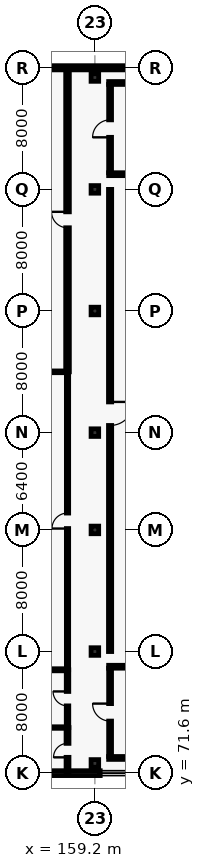
"""IFC4 building model, lengths in metres.
Left out: names, types, materials, properties, quantities, classifications, styles, units other than length and angle.
Written with IfcOpenShell. Run it as: python <this file> out.ifc"""

import sys

from ifc_helpers import new_model, si_unit, direction, frame, frame_2d, origin, origin_2d, place, context, subcontext, project, spatial, rectangle, extrude, element, fill, save


model = new_model("IFC4")
c1 = context("Model", 3, precision=1e-05, world=origin(), true_north=direction((0.0, 1.0)))
c2 = subcontext(c1, "Body", "Model", "MODEL_VIEW")
j1 = project(units=[si_unit("LENGTHUNIT", "METRE"), si_unit("PLANEANGLEUNIT", "RADIAN")], contexts=[c1])
p1 = place(None, origin())
s1 = spatial("IfcSite", under=j1, at=p1, CompositionType="ELEMENT")
p2 = place(p1, origin())
s2 = spatial("IfcBuilding", under=s1, at=p2, CompositionType="ELEMENT")
p3 = place(p2, frame((0.0, 0.0, 24.9)))
s3 = spatial("IfcBuildingStorey", under=s2, at=p3, CompositionType="ELEMENT", Elevation=24.9)
for number, where, z_axis, x_axis in (
    (1, (159.2, 72.24, 0.0), (0.0, 0.0, 1.0), (1.0, 0.0, 0.0)),
    (2, (159.2, 79.6, 0.0), (0.0, 0.0, 1.0), (1.0, 0.0, 0.0)),
    (3, (159.2, 87.6, 0.0), (0.0, 0.0, 1.0), (1.0, 0.0, 0.0)),
    (4, (159.2, 94.0, 0.0), (0.0, 0.0, 1.0), (1.0, 0.0, 0.0)),
    (5, (159.2, 102.0, 0.0), (0.0, 0.0, 1.0), (1.0, 0.0, 0.0)),
    (6, (159.2, 110.0, 0.0), (0.0, 0.0, 1.0), (1.0, 0.0, 0.0)),
    (7, (159.2, 117.36, 0.0), (0.0, 0.0, 1.0), (1.0, 0.0, 0.0)),
):
    element("IfcColumn", number, at=place(p3, frame(where, z_axis=z_axis, x_axis=x_axis)), inside=s3, PredefinedType="COLUMN", context=c2, shape_type="SweptSolid", body=[
        extrude(rectangle(XDim=0.5, YDim=0.5, at=origin_2d()), origin(), (0.0, 0.0, 1.0), 4.5),
    ])
p4 = place(p3, frame((152.8, 118.0, 0.0), z_axis=(0.0, 0.0, 1.0), x_axis=(1.0, 0.0, 0.0)))
e8 = element("IfcWall", 8, at=p4, inside=s3, PredefinedType="SOLIDWALL", context=c2, shape_type="SweptSolid", body=[
    extrude(rectangle(XDim=19.2, YDim=0.275, at=frame_2d((9.6, 0.0))), origin(), (0.0, 0.0, 1.0), 4.3),
])
p5 = place(p4, frame((0.75, 0.0, 0.9)))
e9 = element("IfcOpeningElement", 9, at=p5, cuts=e8, PredefinedType="OPENING", context=c2, shape_type="SweptSolid", body=[
    extrude(rectangle(XDim=1.6, YDim=1.65, at=frame_2d((0.8, 0.825))), frame((0.0, 0.147, 0.0), z_axis=(0.0, -1.0, 0.0), x_axis=(1.0, 0.0, 0.0)), (0.0, 0.0, 1.0), 0.295),
])
p6 = place(p4, frame((10.0, 0.0, 0.9)))
e10 = element("IfcOpeningElement", 10, at=p6, cuts=e8, PredefinedType="OPENING", context=c2, shape_type="SweptSolid", body=[
    extrude(rectangle(XDim=1.4, YDim=2.1, at=frame_2d((0.7, 1.05))), frame((0.0, 0.147, 0.0), z_axis=(0.0, -1.0, 0.0), x_axis=(1.0, 0.0, 0.0)), (0.0, 0.0, 1.0), 0.295),
])
p7 = place(p3, frame((172.0, 71.6, 0.0), z_axis=(0.0, 0.0, 1.0), x_axis=(-1.0, 0.0, 0.0)))
e11 = element("IfcWall", 11, at=p7, inside=s3, PredefinedType="SOLIDWALL", context=c2, shape_type="SweptSolid", body=[
    extrude(rectangle(XDim=19.2, YDim=0.32, at=frame_2d((9.6, 0.0))), origin(), (0.0, 0.0, 1.0), 4.3),
])
p8 = place(p7, frame((10.0, 0.0, 0.8)))
e12 = element("IfcOpeningElement", 12, at=p8, cuts=e11, PredefinedType="OPENING", context=c2, shape_type="SweptSolid", body=[
    extrude(rectangle(XDim=2.45, YDim=2.8, at=frame_2d((1.225, 1.4))), frame((0.0, 0.17, 0.0), z_axis=(0.0, -1.0, 0.0), x_axis=(1.0, 0.0, 0.0)), (0.0, 0.0, 1.0), 0.34),
])
p9 = place(p3, frame((160.105, 72.6, 0.0), z_axis=(0.0, 0.0, 1.0), x_axis=(1.0, 0.0, 0.0)))
e13 = element("IfcWall", 13, at=p9, inside=s3, PredefinedType="PARTITIONING", context=c2, shape_type="SweptSolid", body=[
    extrude(rectangle(XDim=4.495, YDim=0.19, at=frame_2d((2.248, 0.0))), origin(), (0.0, 0.0, 1.0), 3.65),
])
p10 = place(p3, frame((160.105, 78.6, 0.0), z_axis=(0.0, 0.0, 1.0), x_axis=(1.0, 0.0, 0.0)))
e14 = element("IfcWall", 14, at=p10, inside=s3, PredefinedType="PARTITIONING", context=c2, shape_type="SweptSolid", body=[
    extrude(rectangle(XDim=4.495, YDim=0.19, at=frame_2d((2.248, 0.0))), origin(), (0.0, 0.0, 1.0), 4.3),
])
p11 = place(p3, frame((160.2, 72.695, 0.0), z_axis=(0.0, 0.0, 1.0), x_axis=(0.0, 1.0, 0.0)))
e15 = element("IfcWall", 15, at=p11, inside=s3, PredefinedType="PARTITIONING", context=c2, shape_type="SweptSolid", body=[
    extrude(rectangle(XDim=5.81, YDim=0.19, at=frame_2d((2.905, 0.0))), origin(), (0.0, 0.0, 1.0), 4.3),
])
p12 = place(p11, frame((2.33, 0.0, 0.0)))
e16 = element("IfcOpeningElement", 16, at=p12, cuts=e15, PredefinedType="OPENING", context=c2, shape_type="SweptSolid", body=[
    extrude(rectangle(XDim=1.15, YDim=2.2, at=frame_2d((0.575, 1.1))), frame((0.0, 0.105, 0.0), z_axis=(0.0, -1.0, 0.0), x_axis=(1.0, 0.0, 0.0)), (0.0, 0.0, 1.0), 0.21),
])
p13 = place(p3, frame((160.105, 111.0, 0.0), z_axis=(0.0, 0.0, 1.0), x_axis=(1.0, 0.0, 0.0)))
e17 = element("IfcWall", 17, at=p13, inside=s3, PredefinedType="PARTITIONING", context=c2, shape_type="SweptSolid", body=[
    extrude(rectangle(XDim=4.495, YDim=0.19, at=frame_2d((2.248, 0.0))), origin(), (0.0, 0.0, 1.0), 4.3),
])
p14 = place(p3, frame((160.105, 117.0, 0.0), z_axis=(0.0, 0.0, 1.0), x_axis=(1.0, 0.0, 0.0)))
e18 = element("IfcWall", 18, at=p14, inside=s3, PredefinedType="PARTITIONING", context=c2, shape_type="SweptSolid", body=[
    extrude(rectangle(XDim=4.495, YDim=0.19, at=frame_2d((2.248, 0.0))), origin(), (0.0, 0.0, 1.0), 3.65),
])
p15 = place(p3, frame((160.2, 111.095, 0.0), z_axis=(0.0, 0.0, 1.0), x_axis=(0.0, 1.0, 0.0)))
e19 = element("IfcWall", 19, at=p15, inside=s3, PredefinedType="PARTITIONING", context=c2, shape_type="SweptSolid", body=[
    extrude(rectangle(XDim=5.81, YDim=0.19, at=frame_2d((2.905, 0.0))), origin(), (0.0, 0.0, 1.0), 4.3),
])
p16 = place(p15, frame((2.33, 0.0, 0.0)))
e20 = element("IfcOpeningElement", 20, at=p16, cuts=e19, PredefinedType="OPENING", context=c2, shape_type="SweptSolid", body=[
    extrude(rectangle(XDim=1.15, YDim=2.2, at=frame_2d((0.575, 1.1))), frame((0.0, 0.105, 0.0), z_axis=(0.0, -1.0, 0.0), x_axis=(1.0, 0.0, 0.0)), (0.0, 0.0, 1.0), 0.21),
])
p17 = place(p3, frame((157.4, 71.6, 0.0), z_axis=(0.0, 0.0, 1.0), x_axis=(0.0, 1.0, 0.0)))
e21 = element("IfcWall", 21, at=p17, inside=s3, PredefinedType="PARTITIONING", context=c2, shape_type="SweptSolid", body=[
    extrude(rectangle(XDim=3.0, YDim=0.19, at=frame_2d((1.5, 0.0))), origin(), (0.0, 0.0, 1.0), 4.3),
])
p18 = place(p17, frame((1.04, 0.0, 0.0)))
e22 = element("IfcOpeningElement", 22, at=p18, cuts=e21, PredefinedType="OPENING", context=c2, shape_type="SweptSolid", body=[
    extrude(rectangle(XDim=0.92, YDim=2.1, at=frame_2d((0.46, 1.05))), frame((0.0, 0.105, 0.0), z_axis=(0.0, -1.0, 0.0), x_axis=(1.0, 0.0, 0.0)), (0.0, 0.0, 1.0), 0.21),
])
p19 = place(p3, frame((157.4, 74.6, 0.0), z_axis=(0.0, 0.0, 1.0), x_axis=(0.0, 1.0, 0.0)))
e23 = element("IfcWall", 23, at=p19, inside=s3, PredefinedType="PARTITIONING", context=c2, shape_type="SweptSolid", body=[
    extrude(rectangle(XDim=3.8, YDim=0.165, at=frame_2d((1.9, 0.0))), origin(), (0.0, 0.0, 1.0), 4.3),
])
p20 = place(p19, frame((1.425, 0.0, 0.0)))
e24 = element("IfcOpeningElement", 24, at=p20, cuts=e23, PredefinedType="OPENING", context=c2, shape_type="SweptSolid", body=[
    extrude(rectangle(XDim=0.95, YDim=2.1, at=frame_2d((0.475, 1.05))), frame((0.0, 0.093, 0.0), z_axis=(0.0, -1.0, 0.0), x_axis=(1.0, 0.0, 0.0)), (0.0, 0.0, 1.0), 0.185),
])
p21 = place(p3, frame((157.4, 78.4, 0.0), z_axis=(0.0, 0.0, 1.0), x_axis=(0.0, 1.0, 0.0)))
e25 = element("IfcWall", 25, at=p21, inside=s3, PredefinedType="PARTITIONING", context=c2, shape_type="SweptSolid", body=[
    extrude(rectangle(XDim=19.6, YDim=0.15, at=frame_2d((9.8, 0.0))), origin(), (0.0, 0.0, 1.0), 4.3),
])
p22 = place(p21, frame((9.29, 0.0, 0.0)))
e26 = element("IfcOpeningElement", 26, at=p22, cuts=e25, PredefinedType="OPENING", context=c2, shape_type="SweptSolid", body=[
    extrude(rectangle(XDim=1.02, YDim=2.1, at=frame_2d((0.51, 1.05))), frame((0.0, 0.085, 0.0), z_axis=(0.0, -1.0, 0.0), x_axis=(1.0, 0.0, 0.0)), (0.0, 0.0, 1.0), 0.17),
])
p23 = place(p3, frame((157.4, 98.0, 0.0), z_axis=(0.0, 0.0, 1.0), x_axis=(0.0, 1.0, 0.0)))
e27 = element("IfcWall", 27, at=p23, inside=s3, PredefinedType="PARTITIONING", context=c2, shape_type="SweptSolid", body=[
    extrude(rectangle(XDim=20.0, YDim=0.24, at=frame_2d((10.0, 0.0))), origin(), (0.0, 0.0, 1.0), 4.3),
])
p24 = place(p23, frame((9.475, 0.0, 0.0)))
e28 = element("IfcOpeningElement", 28, at=p24, cuts=e27, PredefinedType="OPENING", context=c2, shape_type="SweptSolid", body=[
    extrude(rectangle(XDim=1.05, YDim=2.15, at=frame_2d((0.525, 1.075))), frame((0.0, 0.13, 0.0), z_axis=(0.0, -1.0, 0.0), x_axis=(1.0, 0.0, 0.0)), (0.0, 0.0, 1.0), 0.26),
])
p25 = place(p3, frame((160.2, 110.0, 0.0), z_axis=(0.0, 0.0, 1.0), x_axis=(0.0, -1.0, 0.0)))
e29 = element("IfcWall", 29, at=p25, inside=s3, PredefinedType="PARTITIONING", context=c2, shape_type="SweptSolid", body=[
    extrude(rectangle(XDim=30.4, YDim=0.21, at=frame_2d((15.2, 0.0))), origin(), (0.0, 0.0, 1.0), 4.3),
])
p26 = place(p25, frame((13.98, 0.0, 0.0)))
e30 = element("IfcOpeningElement", 30, at=p26, cuts=e29, PredefinedType="OPENING", context=c2, shape_type="SweptSolid", body=[
    extrude(rectangle(XDim=1.55, YDim=2.25, at=frame_2d((0.775, 1.125))), frame((0.0, 0.115, 0.0), z_axis=(0.0, -1.0, 0.0), x_axis=(1.0, 0.0, 0.0)), (0.0, 0.0, 1.0), 0.23),
])
p27 = place(p3, frame((154.2, 74.6, 0.0), z_axis=(0.0, 0.0, 1.0), x_axis=(1.0, 0.0, 0.0)))
e31 = element("IfcWall", 31, at=p27, inside=s3, PredefinedType="PARTITIONING", context=c2, shape_type="SweptSolid", body=[
    extrude(rectangle(XDim=3.2, YDim=0.1, at=frame_2d((1.6, 0.0))), origin(), (0.0, 0.0, 1.0), 4.3),
])
p28 = place(p3, frame((152.8, 78.4, 0.0), z_axis=(0.0, 0.0, 1.0), x_axis=(1.0, 0.0, 0.0)))
e32 = element("IfcWall", 32, at=p28, inside=s3, PredefinedType="PARTITIONING", context=c2, shape_type="SweptSolid", body=[
    extrude(rectangle(XDim=4.6, YDim=0.135, at=frame_2d((2.3, 0.0))), origin(), (0.0, 0.0, 1.0), 4.3),
])
p29 = place(p3, frame((152.8, 98.0, 0.0), z_axis=(0.0, 0.0, 1.0), x_axis=(1.0, 0.0, 0.0)))
e33 = element("IfcWall", 33, at=p29, inside=s3, PredefinedType="PARTITIONING", context=c2, shape_type="SweptSolid", body=[
    extrude(rectangle(XDim=4.6, YDim=0.115, at=frame_2d((2.3, 0.0))), origin(), (0.0, 0.0, 1.0), 4.3),
])
p30 = place(p8, origin())
e34 = element("IfcWindow", 34, at=p30, inside=s3, PartitioningType="SINGLE_PANEL", PredefinedType="WINDOW", context=c2, shape_type="SweptSolid", body=[
    extrude(rectangle(XDim=2.45, YDim=2.8, at=frame_2d((1.225, 1.4))), frame((0.0, 0.03, 0.0), z_axis=(0.0, -1.0, 0.0), x_axis=(1.0, 0.0, 0.0)), (0.0, 0.0, 1.0), 0.06),
])
fill(e12, e34)
p31 = place(p12, origin())
e35 = element("IfcDoor", 35, at=p31, inside=s3, OperationType="SINGLE_SWING_RIGHT", PredefinedType="DOOR", context=c2, shape_type="SweptSolid", body=[
    extrude(rectangle(XDim=1.15, YDim=2.2, at=frame_2d((0.575, 1.1))), frame((0.0, 0.025, 0.0), z_axis=(0.0, -1.0, 0.0), x_axis=(1.0, 0.0, 0.0)), (0.0, 0.0, 1.0), 0.05),
])
fill(e16, e35)
p32 = place(p16, origin())
e36 = element("IfcDoor", 36, at=p32, inside=s3, OperationType="SINGLE_SWING_LEFT", PredefinedType="DOOR", context=c2, shape_type="SweptSolid", body=[
    extrude(rectangle(XDim=1.15, YDim=2.2, at=frame_2d((0.575, 1.1))), frame((0.0, 0.025, 0.0), z_axis=(0.0, -1.0, 0.0), x_axis=(1.0, 0.0, 0.0)), (0.0, 0.0, 1.0), 0.05),
])
fill(e20, e36)
p33 = place(p18, origin())
e37 = element("IfcDoor", 37, at=p33, inside=s3, OperationType="SINGLE_SWING_LEFT", PredefinedType="DOOR", context=c2, shape_type="SweptSolid", body=[
    extrude(rectangle(XDim=0.92, YDim=2.1, at=frame_2d((0.46, 1.05))), frame((0.0, 0.025, 0.0), z_axis=(0.0, -1.0, 0.0), x_axis=(1.0, 0.0, 0.0)), (0.0, 0.0, 1.0), 0.05),
])
fill(e22, e37)
p34 = place(p20, origin())
e38 = element("IfcDoor", 38, at=p34, inside=s3, OperationType="SINGLE_SWING_RIGHT", PredefinedType="DOOR", context=c2, shape_type="SweptSolid", body=[
    extrude(rectangle(XDim=0.95, YDim=2.1, at=frame_2d((0.475, 1.05))), frame((0.0, 0.025, 0.0), z_axis=(0.0, -1.0, 0.0), x_axis=(1.0, 0.0, 0.0)), (0.0, 0.0, 1.0), 0.05),
])
fill(e24, e38)
p35 = place(p22, origin())
e39 = element("IfcDoor", 39, at=p35, inside=s3, OperationType="SINGLE_SWING_LEFT", PredefinedType="DOOR", context=c2, shape_type="SweptSolid", body=[
    extrude(rectangle(XDim=1.02, YDim=2.1, at=frame_2d((0.51, 1.05))), frame((0.0, 0.025, 0.0), z_axis=(0.0, -1.0, 0.0), x_axis=(1.0, 0.0, 0.0)), (0.0, 0.0, 1.0), 0.05),
])
fill(e26, e39)
p36 = place(p24, origin())
e40 = element("IfcDoor", 40, at=p36, inside=s3, OperationType="SINGLE_SWING_RIGHT", PredefinedType="DOOR", context=c2, shape_type="SweptSolid", body=[
    extrude(rectangle(XDim=1.05, YDim=2.15, at=frame_2d((0.525, 1.075))), frame((0.0, 0.025, 0.0), z_axis=(0.0, -1.0, 0.0), x_axis=(1.0, 0.0, 0.0)), (0.0, 0.0, 1.0), 0.05),
])
fill(e28, e40)
p37 = place(p26, origin())
e41 = element("IfcDoor", 41, at=p37, inside=s3, OperationType="SINGLE_SWING_LEFT", PredefinedType="DOOR", context=c2, shape_type="SweptSolid", body=[
    extrude(rectangle(XDim=1.55, YDim=2.25, at=frame_2d((0.775, 1.125))), frame((0.0, 0.025, 0.0), z_axis=(0.0, -1.0, 0.0), x_axis=(1.0, 0.0, 0.0)), (0.0, 0.0, 1.0), 0.05),
])
fill(e30, e41)
save(model, sys.argv[1])
